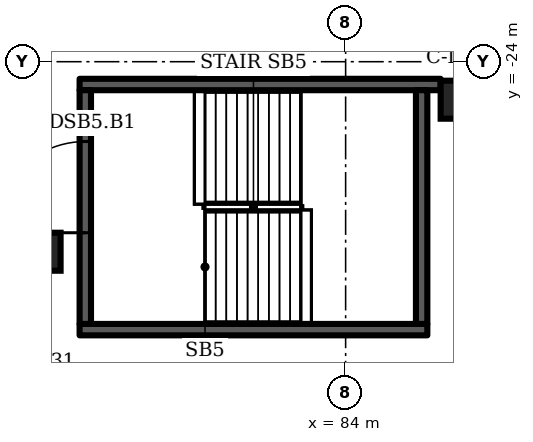
"""IFC4 building model, lengths in metres.
Left out: names, types, materials, properties, quantities, classifications, styles, units other than length and angle.
Written with IfcOpenShell. Run it as: python <this file> out.ifc"""

import sys

from ifc_helpers import new_model, si_unit, direction, frame, frame_2d, origin, origin_2d, place, context, subcontext, project, spatial, rectangle, extrude, element, fill, save


model = new_model("IFC4")
c1 = context("Model", 3, precision=1e-05, world=origin(), true_north=direction((0.0, 1.0)))
c2 = subcontext(c1, "Body", "Model", "MODEL_VIEW")
j1 = project(units=[si_unit("LENGTHUNIT", "METRE"), si_unit("PLANEANGLEUNIT", "RADIAN")], contexts=[c1])
p1 = place(None, origin())
s1 = spatial("IfcSite", under=j1, at=p1, CompositionType="ELEMENT")
p2 = place(p1, origin())
s2 = spatial("IfcBuilding", under=s1, at=p2, CompositionType="ELEMENT")
p3 = place(p2, frame((0.0, 0.0, -7.2)))
s3 = spatial("IfcBuildingStorey", under=s2, at=p3, CompositionType="ELEMENT", Elevation=-7.2)
for number, where, z_axis, x_axis in (
    (1, (87.0, -25.0, 0.0), (0.0, 0.0, 1.0), (1.0, 0.0, 0.0)),
    (2, (76.0, -29.0, 0.0), (0.0, 0.0, 1.0), (1.0, 0.0, 0.0)),
):
    element("IfcColumn", number, at=place(p3, frame(where, z_axis=z_axis, x_axis=x_axis)), inside=s3, PredefinedType="COLUMN", context=c2, shape_type="SweptSolid", body=[
        extrude(rectangle(XDim=1.0, YDim=1.0, at=origin_2d()), origin(), (0.0, 0.0, 1.0), 7.2),
    ])
p4 = place(p3, frame((77.0, -31.05, 0.0), z_axis=(0.0, 0.0, 1.0), x_axis=(1.0, 0.0, 0.0)))
e3 = element("IfcWall", 3, at=p4, inside=s3, PredefinedType="SHEAR", context=c2, shape_type="SweptSolid", body=[
    extrude(rectangle(XDim=9.15, YDim=0.3, at=frame_2d((4.575, 0.0))), origin(), (0.0, 0.0, 1.0), 6.9),
])
p5 = place(p3, frame((77.0, -24.6, 0.0), z_axis=(0.0, 0.0, 1.0), x_axis=(1.0, 0.0, 0.0)))
e4 = element("IfcWall", 4, at=p5, inside=s3, PredefinedType="SHEAR", context=c2, shape_type="SweptSolid", body=[
    extrude(rectangle(XDim=9.5, YDim=0.3, at=frame_2d((4.75, 0.0))), origin(), (0.0, 0.0, 1.0), 6.9),
])
p6 = place(p3, frame((77.15, -30.9, 0.0), z_axis=(0.0, 0.0, 1.0), x_axis=(0.0, 1.0, 0.0)))
e5 = element("IfcWall", 5, at=p6, inside=s3, PredefinedType="SHEAR", context=c2, shape_type="SweptSolid", body=[
    extrude(rectangle(XDim=6.15, YDim=0.3, at=frame_2d((3.075, 0.0))), origin(), (0.0, 0.0, 1.0), 6.9),
])
p7 = place(p6, frame((2.4, 0.0, 0.0)))
e6 = element("IfcOpeningElement", 6, at=p7, cuts=e5, PredefinedType="OPENING", context=c2, shape_type="SweptSolid", body=[
    extrude(rectangle(XDim=2.4, YDim=2.1, at=frame_2d((1.2, 1.05))), frame((0.0, 0.16, 0.0), z_axis=(0.0, -1.0, 0.0), x_axis=(1.0, 0.0, 0.0)), (0.0, 0.0, 1.0), 0.32),
])
p8 = place(p3, frame((86.0, -30.9, 0.0), z_axis=(0.0, 0.0, 1.0), x_axis=(0.0, 1.0, 0.0)))
e7 = element("IfcWall", 7, at=p8, inside=s3, PredefinedType="SHEAR", context=c2, shape_type="SweptSolid", body=[
    extrude(rectangle(XDim=6.15, YDim=0.3, at=frame_2d((3.075, 0.0))), origin(), (0.0, 0.0, 1.0), 6.9),
])
p9 = place(p7, origin())
e8 = element("IfcDoor", 8, at=p9, inside=s3, OperationType="DOUBLE_DOOR_SINGLE_SWING", PredefinedType="DOOR", context=c2, shape_type="SweptSolid", body=[
    extrude(rectangle(XDim=2.4, YDim=2.1, at=frame_2d((1.2, 1.05))), frame((0.0, 0.025, 0.0), z_axis=(0.0, -1.0, 0.0), x_axis=(1.0, 0.0, 0.0)), (0.0, 0.0, 1.0), 0.05),
])
fill(e6, e8)
save(model, sys.argv[1])
